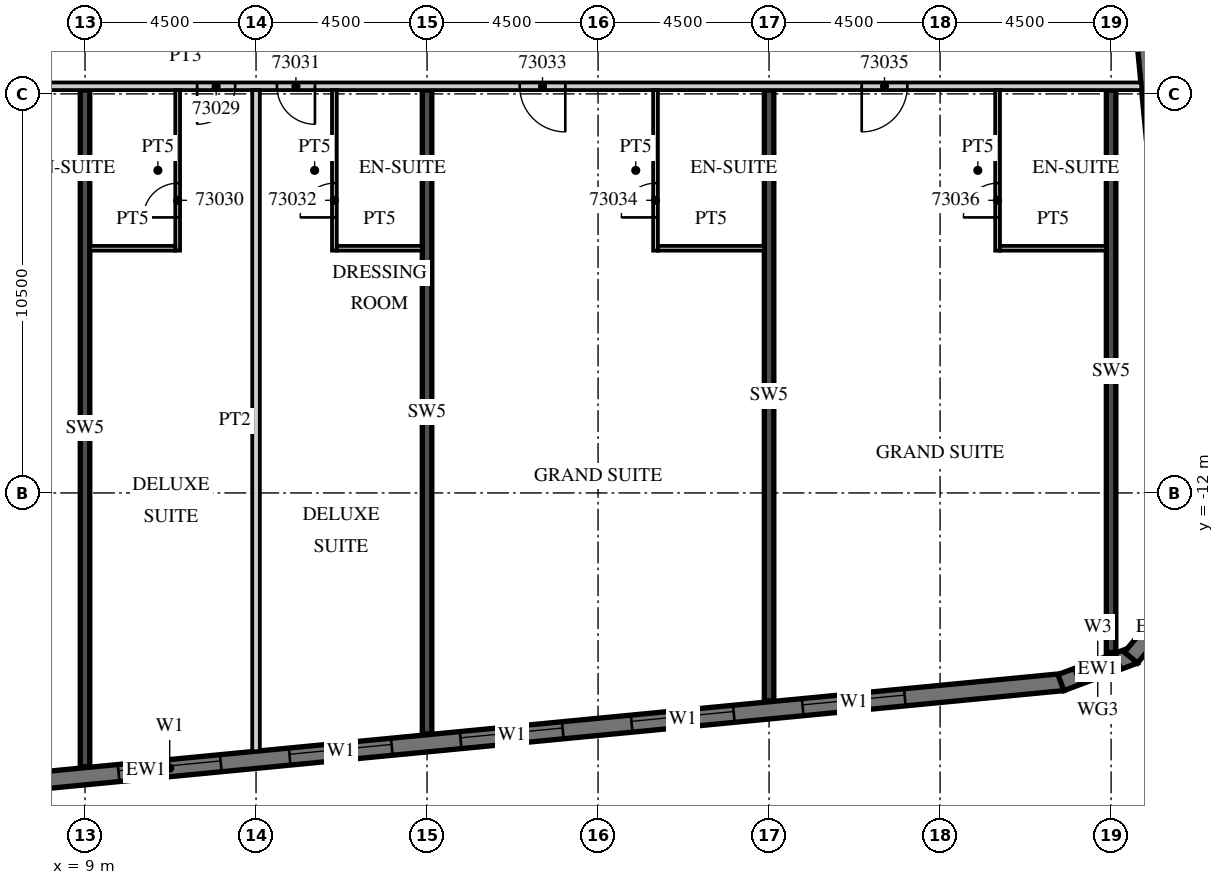
"""IFC4 building model, lengths in metres.
Left out: names, types, materials, properties, quantities, classifications, styles, units other than length and angle.
Written with IfcOpenShell. Run it as: python <this file> out.ifc"""

import sys

from ifc_helpers import new_model, si_unit, direction, frame, frame_2d, origin, place, context, subcontext, project, spatial, polyline, rectangle, outline, extrude, element, fill, save


model = new_model("IFC4")
c1 = context("Model", 3, precision=1e-05, world=origin(), true_north=direction((0.0, 1.0)))
c2 = subcontext(c1, "Body", "Model", "MODEL_VIEW")
j1 = project(units=[si_unit("LENGTHUNIT", "METRE"), si_unit("PLANEANGLEUNIT", "RADIAN")], contexts=[c1])
p1 = place(None, origin())
s1 = spatial("IfcSite", under=j1, at=p1, CompositionType="ELEMENT")
p2 = place(p1, origin())
s2 = spatial("IfcBuilding", under=s1, at=p2, CompositionType="ELEMENT")
p3 = place(p2, frame((0.0, 0.0, 291.6)))
s3 = spatial("IfcBuildingStorey", under=s2, at=p3, CompositionType="ELEMENT", Elevation=291.6)
p4 = place(p3, frame((9.0, -19.207, 0.0), z_axis=(0.0, 0.0, 1.0), x_axis=(0.0, 1.0, 0.0)))
e1 = element("IfcWall", 1, at=p4, inside=s3, PredefinedType="SHEAR", context=c2, shape_type="SweptSolid", body=[
    extrude(rectangle(XDim=17.807, YDim=0.25, at=frame_2d((8.904, 0.0))), origin(), (0.0, 0.0, 1.0), 3.3),
])
p5 = place(p3, frame((18.0, -18.341, 0.0), z_axis=(0.0, 0.0, 1.0), x_axis=(0.0, 1.0, 0.0)))
e2 = element("IfcWall", 2, at=p5, inside=s3, PredefinedType="SHEAR", context=c2, shape_type="SweptSolid", body=[
    extrude(rectangle(XDim=16.941, YDim=0.25, at=frame_2d((8.47, 0.0))), origin(), (0.0, 0.0, 1.0), 3.3),
])
p6 = place(p3, frame((27.0, -17.474, 0.0), z_axis=(0.0, 0.0, 1.0), x_axis=(0.0, 1.0, 0.0)))
e3 = element("IfcWall", 3, at=p6, inside=s3, PredefinedType="SHEAR", context=c2, shape_type="SweptSolid", body=[
    extrude(rectangle(XDim=16.074, YDim=0.25, at=frame_2d((8.037, 0.0))), origin(), (0.0, 0.0, 1.0), 3.3),
])
p7 = place(p3, frame((36.0, -16.199, 0.0), z_axis=(0.0, 0.0, 1.0), x_axis=(0.0, 1.0, 0.0)))
e4 = element("IfcWall", 4, at=p7, inside=s3, PredefinedType="SHEAR", context=c2, shape_type="SweptSolid", body=[
    extrude(rectangle(XDim=14.799, YDim=0.25, at=frame_2d((7.399, 0.0))), origin(), (0.0, 0.0, 1.0), 3.3),
])
p8 = place(p3, frame((-13.521, -21.624, 0.0), z_axis=(0.0, 0.0, 1.0), x_axis=(0.995396186218, 0.095845878695, 0.0)))
e5 = element("IfcWall", 5, at=p8, inside=s3, PredefinedType="SOLIDWALL", context=c2, shape_type="SweptSolid", body=[
    extrude(rectangle(XDim=48.481, YDim=0.45, at=frame_2d((24.241, 0.0))), origin(), (0.0, 0.0, 1.0), 3.02),
])
p9 = place(p8, frame((0.91, 0.0, 0.45)))
e6 = element("IfcOpeningElement", 6, at=p9, cuts=e5, PredefinedType="OPENING", context=c2, shape_type="SweptSolid", body=[
    extrude(rectangle(XDim=2.7, YDim=2.25, at=frame_2d((1.35, 1.125))), frame((0.0, 0.235, 0.0), z_axis=(0.0, -1.0, 0.0), x_axis=(1.0, 0.0, 0.0)), (0.0, 0.0, 1.0), 0.47),
])
p10 = place(p8, frame((5.431, 0.0, 0.45)))
e7 = element("IfcOpeningElement", 7, at=p10, cuts=e5, PredefinedType="OPENING", context=c2, shape_type="SweptSolid", body=[
    extrude(rectangle(XDim=2.7, YDim=2.25, at=frame_2d((1.35, 1.125))), frame((0.0, 0.235, 0.0), z_axis=(0.0, -1.0, 0.0), x_axis=(1.0, 0.0, 0.0)), (0.0, 0.0, 1.0), 0.47),
])
p11 = place(p8, frame((9.952, 0.0, 0.45)))
e8 = element("IfcOpeningElement", 8, at=p11, cuts=e5, PredefinedType="OPENING", context=c2, shape_type="SweptSolid", body=[
    extrude(rectangle(XDim=2.7, YDim=2.25, at=frame_2d((1.35, 1.125))), frame((0.0, 0.235, 0.0), z_axis=(0.0, -1.0, 0.0), x_axis=(1.0, 0.0, 0.0)), (0.0, 0.0, 1.0), 0.47),
])
p12 = place(p8, frame((14.473, 0.0, 0.45)))
e9 = element("IfcOpeningElement", 9, at=p12, cuts=e5, PredefinedType="OPENING", context=c2, shape_type="SweptSolid", body=[
    extrude(rectangle(XDim=2.7, YDim=2.25, at=frame_2d((1.35, 1.125))), frame((0.0, 0.235, 0.0), z_axis=(0.0, -1.0, 0.0), x_axis=(1.0, 0.0, 0.0)), (0.0, 0.0, 1.0), 0.47),
])
p13 = place(p8, frame((18.994, 0.0, 0.45)))
e10 = element("IfcOpeningElement", 10, at=p13, cuts=e5, PredefinedType="OPENING", context=c2, shape_type="SweptSolid", body=[
    extrude(rectangle(XDim=2.7, YDim=2.25, at=frame_2d((1.35, 1.125))), frame((0.0, 0.235, 0.0), z_axis=(0.0, -1.0, 0.0), x_axis=(1.0, 0.0, 0.0)), (0.0, 0.0, 1.0), 0.47),
])
p14 = place(p8, frame((23.514, 0.0, 0.45)))
e11 = element("IfcOpeningElement", 11, at=p14, cuts=e5, PredefinedType="OPENING", context=c2, shape_type="SweptSolid", body=[
    extrude(rectangle(XDim=2.7, YDim=2.25, at=frame_2d((1.35, 1.125))), frame((0.0, 0.235, 0.0), z_axis=(0.0, -1.0, 0.0), x_axis=(1.0, 0.0, 0.0)), (0.0, 0.0, 1.0), 0.47),
])
p15 = place(p8, frame((28.035, 0.0, 0.45)))
e12 = element("IfcOpeningElement", 12, at=p15, cuts=e5, PredefinedType="OPENING", context=c2, shape_type="SweptSolid", body=[
    extrude(rectangle(XDim=2.7, YDim=2.25, at=frame_2d((1.35, 1.125))), frame((0.0, 0.235, 0.0), z_axis=(0.0, -1.0, 0.0), x_axis=(1.0, 0.0, 0.0)), (0.0, 0.0, 1.0), 0.47),
])
p16 = place(p8, frame((32.556, 0.0, 0.45)))
e13 = element("IfcOpeningElement", 13, at=p16, cuts=e5, PredefinedType="OPENING", context=c2, shape_type="SweptSolid", body=[
    extrude(rectangle(XDim=2.7, YDim=2.25, at=frame_2d((1.35, 1.125))), frame((0.0, 0.235, 0.0), z_axis=(0.0, -1.0, 0.0), x_axis=(1.0, 0.0, 0.0)), (0.0, 0.0, 1.0), 0.47),
])
p17 = place(p8, frame((37.077, 0.0, 0.45)))
e14 = element("IfcOpeningElement", 14, at=p17, cuts=e5, PredefinedType="OPENING", context=c2, shape_type="SweptSolid", body=[
    extrude(rectangle(XDim=2.7, YDim=2.25, at=frame_2d((1.35, 1.125))), frame((0.0, 0.235, 0.0), z_axis=(0.0, -1.0, 0.0), x_axis=(1.0, 0.0, 0.0)), (0.0, 0.0, 1.0), 0.47),
])
p18 = place(p8, frame((41.598, 0.0, 0.45)))
e15 = element("IfcOpeningElement", 15, at=p18, cuts=e5, PredefinedType="OPENING", context=c2, shape_type="SweptSolid", body=[
    extrude(rectangle(XDim=2.7, YDim=2.25, at=frame_2d((1.35, 1.125))), frame((0.0, 0.235, 0.0), z_axis=(0.0, -1.0, 0.0), x_axis=(1.0, 0.0, 0.0)), (0.0, 0.0, 1.0), 0.47),
])
p19 = place(p3, frame((34.679, -16.99, 0.0), z_axis=(0.0, 0.0, 1.0), x_axis=(0.936677599948, 0.350192909346, 0.0)))
e16 = element("IfcWall", 16, at=p19, inside=s3, PredefinedType="SOLIDWALL", context=c2, shape_type="SweptSolid", body=[
    extrude(outline(polyline([(0.0, -0.225), (2.071, -0.225), (1.95, 0.225), (0.121, 0.225), (0.0, -0.225)])), origin(), (0.0, 0.0, 1.0), 3.02),
])
p20 = place(p19, frame((0.435, 0.0, 0.45)))
e17 = element("IfcOpeningElement", 17, at=p20, cuts=e16, PredefinedType="OPENING", context=c2, shape_type="SweptSolid", body=[
    extrude(rectangle(XDim=1.2, YDim=2.25, at=frame_2d((0.6, 1.125))), frame((0.0, 0.235, 0.0), z_axis=(0.0, -1.0, 0.0), x_axis=(1.0, 0.0, 0.0)), (0.0, 0.0, 1.0), 0.47),
])
p21 = place(p3, frame((36.524, -16.333, 0.0), z_axis=(0.0, 0.0, 1.0), x_axis=(0.636046112757, 0.771651049663, 0.0)))
e18 = element("IfcWall", 18, at=p21, inside=s3, PredefinedType="SOLIDWALL", context=c2, shape_type="SweptSolid", body=[
    extrude(outline(polyline([(0.0, -0.225), (2.071, -0.225), (1.95, 0.225), (0.121, 0.225), (0.0, -0.225)])), origin(), (0.0, 0.0, 1.0), 3.02),
])
p22 = place(p3, frame((38.132, -12.858, 0.0), z_axis=(0.0, 0.0, 1.0), x_axis=(-0.095847749461, 0.995396006082, 0.0)))
e19 = element("IfcWall", 19, at=p22, inside=s3, PredefinedType="SOLIDWALL", context=c2, shape_type="SweptSolid", body=[
    extrude(rectangle(XDim=32.0, YDim=0.45, at=frame_2d((16.0, 0.0))), origin(), (0.0, 0.0, 1.0), 3.02),
])
p23 = place(p3, frame((-13.5, -1.3, 0.0), z_axis=(0.0, 0.0, 1.0), x_axis=(1.0, 0.0, 0.0)))
e20 = element("IfcWall", 20, at=p23, inside=s3, PredefinedType="PARTITIONING", context=c2, shape_type="SweptSolid", body=[
    extrude(rectangle(XDim=50.293, YDim=0.2, at=frame_2d((25.146, 0.0))), origin(), (0.0, 0.0, 1.0), 3.02),
])
p24 = place(p23, frame((0.575, 0.0, 0.0)))
e21 = element("IfcOpeningElement", 21, at=p24, cuts=e20, PredefinedType="OPENING", context=c2, shape_type="SweptSolid", body=[
    extrude(rectangle(XDim=1.0, YDim=2.1, at=frame_2d((0.5, 1.05))), frame((0.0, 0.11, 0.0), z_axis=(0.0, -1.0, 0.0), x_axis=(1.0, 0.0, 0.0)), (0.0, 0.0, 1.0), 0.22),
])
p25 = place(p23, frame((9.863, 0.0, 0.0)))
e22 = element("IfcOpeningElement", 22, at=p25, cuts=e20, PredefinedType="OPENING", context=c2, shape_type="SweptSolid", body=[
    extrude(rectangle(XDim=1.2, YDim=2.1, at=frame_2d((0.6, 1.05))), frame((0.0, 0.11, 0.0), z_axis=(0.0, -1.0, 0.0), x_axis=(1.0, 0.0, 0.0)), (0.0, 0.0, 1.0), 0.22),
])
p26 = place(p23, frame((18.862, 0.0, 0.0)))
e23 = element("IfcOpeningElement", 23, at=p26, cuts=e20, PredefinedType="OPENING", context=c2, shape_type="SweptSolid", body=[
    extrude(rectangle(XDim=1.2, YDim=2.1, at=frame_2d((0.6, 1.05))), frame((0.0, 0.11, 0.0), z_axis=(0.0, -1.0, 0.0), x_axis=(1.0, 0.0, 0.0)), (0.0, 0.0, 1.0), 0.22),
])
p27 = place(p23, frame((25.45, 0.0, 0.0)))
e24 = element("IfcOpeningElement", 24, at=p27, cuts=e20, PredefinedType="OPENING", context=c2, shape_type="SweptSolid", body=[
    extrude(rectangle(XDim=1.0, YDim=2.1, at=frame_2d((0.5, 1.05))), frame((0.0, 0.11, 0.0), z_axis=(0.0, -1.0, 0.0), x_axis=(1.0, 0.0, 0.0)), (0.0, 0.0, 1.0), 0.22),
])
p28 = place(p23, frame((27.55, 0.0, 0.0)))
e25 = element("IfcOpeningElement", 25, at=p28, cuts=e20, PredefinedType="OPENING", context=c2, shape_type="SweptSolid", body=[
    extrude(rectangle(XDim=1.0, YDim=2.1, at=frame_2d((0.5, 1.05))), frame((0.0, 0.11, 0.0), z_axis=(0.0, -1.0, 0.0), x_axis=(1.0, 0.0, 0.0)), (0.0, 0.0, 1.0), 0.22),
])
p29 = place(p23, frame((33.938, 0.0, 0.0)))
e26 = element("IfcOpeningElement", 26, at=p29, cuts=e20, PredefinedType="OPENING", context=c2, shape_type="SweptSolid", body=[
    extrude(rectangle(XDim=1.2, YDim=2.1, at=frame_2d((0.6, 1.05))), frame((0.0, 0.11, 0.0), z_axis=(0.0, -1.0, 0.0), x_axis=(1.0, 0.0, 0.0)), (0.0, 0.0, 1.0), 0.22),
])
p30 = place(p23, frame((42.938, 0.0, 0.0)))
e27 = element("IfcOpeningElement", 27, at=p30, cuts=e20, PredefinedType="OPENING", context=c2, shape_type="SweptSolid", body=[
    extrude(rectangle(XDim=1.2, YDim=2.1, at=frame_2d((0.6, 1.05))), frame((0.0, 0.11, 0.0), z_axis=(0.0, -1.0, 0.0), x_axis=(1.0, 0.0, 0.0)), (0.0, 0.0, 1.0), 0.22),
])
p31 = place(p3, frame((13.5, -18.796, 0.0), z_axis=(0.0, 0.0, 1.0), x_axis=(0.0, 1.0, 0.0)))
e28 = element("IfcWall", 28, at=p31, inside=s3, PredefinedType="PARTITIONING", context=c2, shape_type="SweptSolid", body=[
    extrude(rectangle(XDim=17.396, YDim=0.2, at=frame_2d((8.698, 0.0))), origin(), (0.0, 0.0, 1.0), 3.02),
])
p32 = place(p3, frame((11.438, -5.625, 0.0), z_axis=(0.0, 0.0, 1.0), x_axis=(0.0, 1.0, 0.0)))
e29 = element("IfcWall", 29, at=p32, inside=s3, PredefinedType="PARTITIONING", context=c2, shape_type="SweptSolid", body=[
    extrude(rectangle(XDim=4.225, YDim=0.125, at=frame_2d((2.113, 0.0))), origin(), (0.0, 0.0, 1.0), 3.02),
])
p33 = place(p32, frame((0.875, 0.0, 0.0)))
e30 = element("IfcOpeningElement", 30, at=p33, cuts=e29, PredefinedType="OPENING", context=c2, shape_type="SweptSolid", body=[
    extrude(rectangle(XDim=0.9, YDim=2.1, at=frame_2d((0.45, 1.05))), frame((0.0, 0.073, 0.0), z_axis=(0.0, -1.0, 0.0), x_axis=(1.0, 0.0, 0.0)), (0.0, 0.0, 1.0), 0.145),
])
p34 = place(p3, frame((9.125, -5.562, 0.0), z_axis=(0.0, 0.0, 1.0), x_axis=(1.0, 0.0, 0.0)))
e31 = element("IfcWall", 31, at=p34, inside=s3, PredefinedType="PARTITIONING", context=c2, shape_type="SweptSolid", body=[
    extrude(rectangle(XDim=2.25, YDim=0.125, at=frame_2d((1.125, 0.0))), origin(), (0.0, 0.0, 1.0), 3.02),
])
p35 = place(p3, frame((15.562, -5.625, 0.0), z_axis=(0.0, 0.0, 1.0), x_axis=(0.0, 1.0, 0.0)))
e32 = element("IfcWall", 32, at=p35, inside=s3, PredefinedType="PARTITIONING", context=c2, shape_type="SweptSolid", body=[
    extrude(rectangle(XDim=4.225, YDim=0.125, at=frame_2d((2.113, 0.0))), origin(), (0.0, 0.0, 1.0), 3.02),
])
p36 = place(p35, frame((0.875, 0.0, 0.0)))
e33 = element("IfcOpeningElement", 33, at=p36, cuts=e32, PredefinedType="OPENING", context=c2, shape_type="SweptSolid", body=[
    extrude(rectangle(XDim=0.9, YDim=2.1, at=frame_2d((0.45, 1.05))), frame((0.0, 0.073, 0.0), z_axis=(0.0, -1.0, 0.0), x_axis=(1.0, 0.0, 0.0)), (0.0, 0.0, 1.0), 0.145),
])
p37 = place(p3, frame((15.625, -5.562, 0.0), z_axis=(0.0, 0.0, 1.0), x_axis=(1.0, 0.0, 0.0)))
e34 = element("IfcWall", 34, at=p37, inside=s3, PredefinedType="PARTITIONING", context=c2, shape_type="SweptSolid", body=[
    extrude(rectangle(XDim=2.25, YDim=0.125, at=frame_2d((1.125, 0.0))), origin(), (0.0, 0.0, 1.0), 3.02),
])
p38 = place(p3, frame((24.012, -5.625, 0.0), z_axis=(0.0, 0.0, 1.0), x_axis=(0.0, 1.0, 0.0)))
e35 = element("IfcWall", 35, at=p38, inside=s3, PredefinedType="PARTITIONING", context=c2, shape_type="SweptSolid", body=[
    extrude(rectangle(XDim=4.225, YDim=0.125, at=frame_2d((2.113, 0.0))), origin(), (0.0, 0.0, 1.0), 3.02),
])
p39 = place(p38, frame((0.875, 0.0, 0.0)))
e36 = element("IfcOpeningElement", 36, at=p39, cuts=e35, PredefinedType="OPENING", context=c2, shape_type="SweptSolid", body=[
    extrude(rectangle(XDim=0.9, YDim=2.1, at=frame_2d((0.45, 1.05))), frame((0.0, 0.073, 0.0), z_axis=(0.0, -1.0, 0.0), x_axis=(1.0, 0.0, 0.0)), (0.0, 0.0, 1.0), 0.145),
])
p40 = place(p3, frame((24.075, -5.562, 0.0), z_axis=(0.0, 0.0, 1.0), x_axis=(1.0, 0.0, 0.0)))
e37 = element("IfcWall", 37, at=p40, inside=s3, PredefinedType="PARTITIONING", context=c2, shape_type="SweptSolid", body=[
    extrude(rectangle(XDim=2.8, YDim=0.125, at=frame_2d((1.4, 0.0))), origin(), (0.0, 0.0, 1.0), 3.02),
])
p41 = place(p3, frame((33.013, -5.625, 0.0), z_axis=(0.0, 0.0, 1.0), x_axis=(0.0, 1.0, 0.0)))
e38 = element("IfcWall", 38, at=p41, inside=s3, PredefinedType="PARTITIONING", context=c2, shape_type="SweptSolid", body=[
    extrude(rectangle(XDim=4.225, YDim=0.125, at=frame_2d((2.113, 0.0))), origin(), (0.0, 0.0, 1.0), 3.02),
])
p42 = place(p41, frame((0.875, 0.0, 0.0)))
e39 = element("IfcOpeningElement", 39, at=p42, cuts=e38, PredefinedType="OPENING", context=c2, shape_type="SweptSolid", body=[
    extrude(rectangle(XDim=0.9, YDim=2.1, at=frame_2d((0.45, 1.05))), frame((0.0, 0.073, 0.0), z_axis=(0.0, -1.0, 0.0), x_axis=(1.0, 0.0, 0.0)), (0.0, 0.0, 1.0), 0.145),
])
p43 = place(p3, frame((33.075, -5.562, 0.0), z_axis=(0.0, 0.0, 1.0), x_axis=(1.0, 0.0, 0.0)))
e40 = element("IfcWall", 40, at=p43, inside=s3, PredefinedType="PARTITIONING", context=c2, shape_type="SweptSolid", body=[
    extrude(rectangle(XDim=2.8, YDim=0.125, at=frame_2d((1.4, 0.0))), origin(), (0.0, 0.0, 1.0), 3.02),
])
p44 = place(p14, origin())
e41 = element("IfcWindow", 41, at=p44, inside=s3, PartitioningType="SINGLE_PANEL", PredefinedType="WINDOW", context=c2, shape_type="SweptSolid", body=[
    extrude(rectangle(XDim=2.7, YDim=2.25, at=frame_2d((1.35, 1.125))), frame((0.0, 0.09, 0.0), z_axis=(0.0, -1.0, 0.0), x_axis=(1.0, 0.0, 0.0)), (0.0, 0.0, 1.0), 0.06),
])
fill(e11, e41)
p45 = place(p15, origin())
e42 = element("IfcWindow", 42, at=p45, inside=s3, PartitioningType="SINGLE_PANEL", PredefinedType="WINDOW", context=c2, shape_type="SweptSolid", body=[
    extrude(rectangle(XDim=2.7, YDim=2.25, at=frame_2d((1.35, 1.125))), frame((0.0, 0.09, 0.0), z_axis=(0.0, -1.0, 0.0), x_axis=(1.0, 0.0, 0.0)), (0.0, 0.0, 1.0), 0.06),
])
fill(e12, e42)
p46 = place(p16, origin())
e43 = element("IfcWindow", 43, at=p46, inside=s3, PartitioningType="SINGLE_PANEL", PredefinedType="WINDOW", context=c2, shape_type="SweptSolid", body=[
    extrude(rectangle(XDim=2.7, YDim=2.25, at=frame_2d((1.35, 1.125))), frame((0.0, 0.09, 0.0), z_axis=(0.0, -1.0, 0.0), x_axis=(1.0, 0.0, 0.0)), (0.0, 0.0, 1.0), 0.06),
])
fill(e13, e43)
p47 = place(p17, origin())
e44 = element("IfcWindow", 44, at=p47, inside=s3, PartitioningType="SINGLE_PANEL", PredefinedType="WINDOW", context=c2, shape_type="SweptSolid", body=[
    extrude(rectangle(XDim=2.7, YDim=2.25, at=frame_2d((1.35, 1.125))), frame((0.0, 0.09, 0.0), z_axis=(0.0, -1.0, 0.0), x_axis=(1.0, 0.0, 0.0)), (0.0, 0.0, 1.0), 0.06),
])
fill(e14, e44)
p48 = place(p18, origin())
e45 = element("IfcWindow", 45, at=p48, inside=s3, PartitioningType="SINGLE_PANEL", PredefinedType="WINDOW", context=c2, shape_type="SweptSolid", body=[
    extrude(rectangle(XDim=2.7, YDim=2.25, at=frame_2d((1.35, 1.125))), frame((0.0, 0.09, 0.0), z_axis=(0.0, -1.0, 0.0), x_axis=(1.0, 0.0, 0.0)), (0.0, 0.0, 1.0), 0.06),
])
fill(e15, e45)
p49 = place(p20, origin())
e46 = element("IfcWindow", 46, at=p49, inside=s3, PartitioningType="SINGLE_PANEL", PredefinedType="WINDOW", context=c2, shape_type="SweptSolid", body=[
    extrude(rectangle(XDim=1.2, YDim=2.25, at=frame_2d((0.6, 1.125))), frame((0.0, 0.09, 0.0), z_axis=(0.0, -1.0, 0.0), x_axis=(1.0, 0.0, 0.0)), (0.0, 0.0, 1.0), 0.06),
])
fill(e17, e46)
p50 = place(p27, origin())
e47 = element("IfcDoor", 47, at=p50, inside=s3, OperationType="SINGLE_SWING_LEFT", PredefinedType="DOOR", context=c2, shape_type="SweptSolid", body=[
    extrude(rectangle(XDim=1.0, YDim=2.1, at=frame_2d((0.5, 1.05))), frame((0.0, 0.025, 0.0), z_axis=(0.0, -1.0, 0.0), x_axis=(1.0, 0.0, 0.0)), (0.0, 0.0, 1.0), 0.05),
])
fill(e24, e47)
p51 = place(p33, origin())
e48 = element("IfcDoor", 48, at=p51, inside=s3, OperationType="SINGLE_SWING_LEFT", PredefinedType="DOOR", context=c2, shape_type="SweptSolid", body=[
    extrude(rectangle(XDim=0.9, YDim=2.1, at=frame_2d((0.45, 1.05))), frame((0.0, 0.025, 0.0), z_axis=(0.0, -1.0, 0.0), x_axis=(1.0, 0.0, 0.0)), (0.0, 0.0, 1.0), 0.05),
])
fill(e30, e48)
p52 = place(p28, origin())
e49 = element("IfcDoor", 49, at=p52, inside=s3, OperationType="SINGLE_SWING_RIGHT", PredefinedType="DOOR", context=c2, shape_type="SweptSolid", body=[
    extrude(rectangle(XDim=1.0, YDim=2.1, at=frame_2d((0.5, 1.05))), frame((0.0, 0.025, 0.0), z_axis=(0.0, -1.0, 0.0), x_axis=(1.0, 0.0, 0.0)), (0.0, 0.0, 1.0), 0.05),
])
fill(e25, e49)
p53 = place(p36, origin())
e50 = element("IfcDoor", 50, at=p53, inside=s3, OperationType="SINGLE_SWING_LEFT", PredefinedType="DOOR", context=c2, shape_type="SweptSolid", body=[
    extrude(rectangle(XDim=0.9, YDim=2.1, at=frame_2d((0.45, 1.05))), frame((0.0, 0.025, 0.0), z_axis=(0.0, -1.0, 0.0), x_axis=(1.0, 0.0, 0.0)), (0.0, 0.0, 1.0), 0.05),
])
fill(e33, e50)
p54 = place(p29, origin())
e51 = element("IfcDoor", 51, at=p54, inside=s3, OperationType="SINGLE_SWING_RIGHT", PredefinedType="DOOR", context=c2, shape_type="SweptSolid", body=[
    extrude(rectangle(XDim=1.2, YDim=2.1, at=frame_2d((0.6, 1.05))), frame((0.0, 0.025, 0.0), z_axis=(0.0, -1.0, 0.0), x_axis=(1.0, 0.0, 0.0)), (0.0, 0.0, 1.0), 0.05),
])
fill(e26, e51)
p55 = place(p39, origin())
e52 = element("IfcDoor", 52, at=p55, inside=s3, OperationType="SINGLE_SWING_LEFT", PredefinedType="DOOR", context=c2, shape_type="SweptSolid", body=[
    extrude(rectangle(XDim=0.9, YDim=2.1, at=frame_2d((0.45, 1.05))), frame((0.0, 0.025, 0.0), z_axis=(0.0, -1.0, 0.0), x_axis=(1.0, 0.0, 0.0)), (0.0, 0.0, 1.0), 0.05),
])
fill(e36, e52)
p56 = place(p30, origin())
e53 = element("IfcDoor", 53, at=p56, inside=s3, OperationType="SINGLE_SWING_LEFT", PredefinedType="DOOR", context=c2, shape_type="SweptSolid", body=[
    extrude(rectangle(XDim=1.2, YDim=2.1, at=frame_2d((0.6, 1.05))), frame((0.0, 0.025, 0.0), z_axis=(0.0, -1.0, 0.0), x_axis=(1.0, 0.0, 0.0)), (0.0, 0.0, 1.0), 0.05),
])
fill(e27, e53)
p57 = place(p42, origin())
e54 = element("IfcDoor", 54, at=p57, inside=s3, OperationType="SINGLE_SWING_LEFT", PredefinedType="DOOR", context=c2, shape_type="SweptSolid", body=[
    extrude(rectangle(XDim=0.9, YDim=2.1, at=frame_2d((0.45, 1.05))), frame((0.0, 0.025, 0.0), z_axis=(0.0, -1.0, 0.0), x_axis=(1.0, 0.0, 0.0)), (0.0, 0.0, 1.0), 0.05),
])
fill(e39, e54)
save(model, sys.argv[1])
